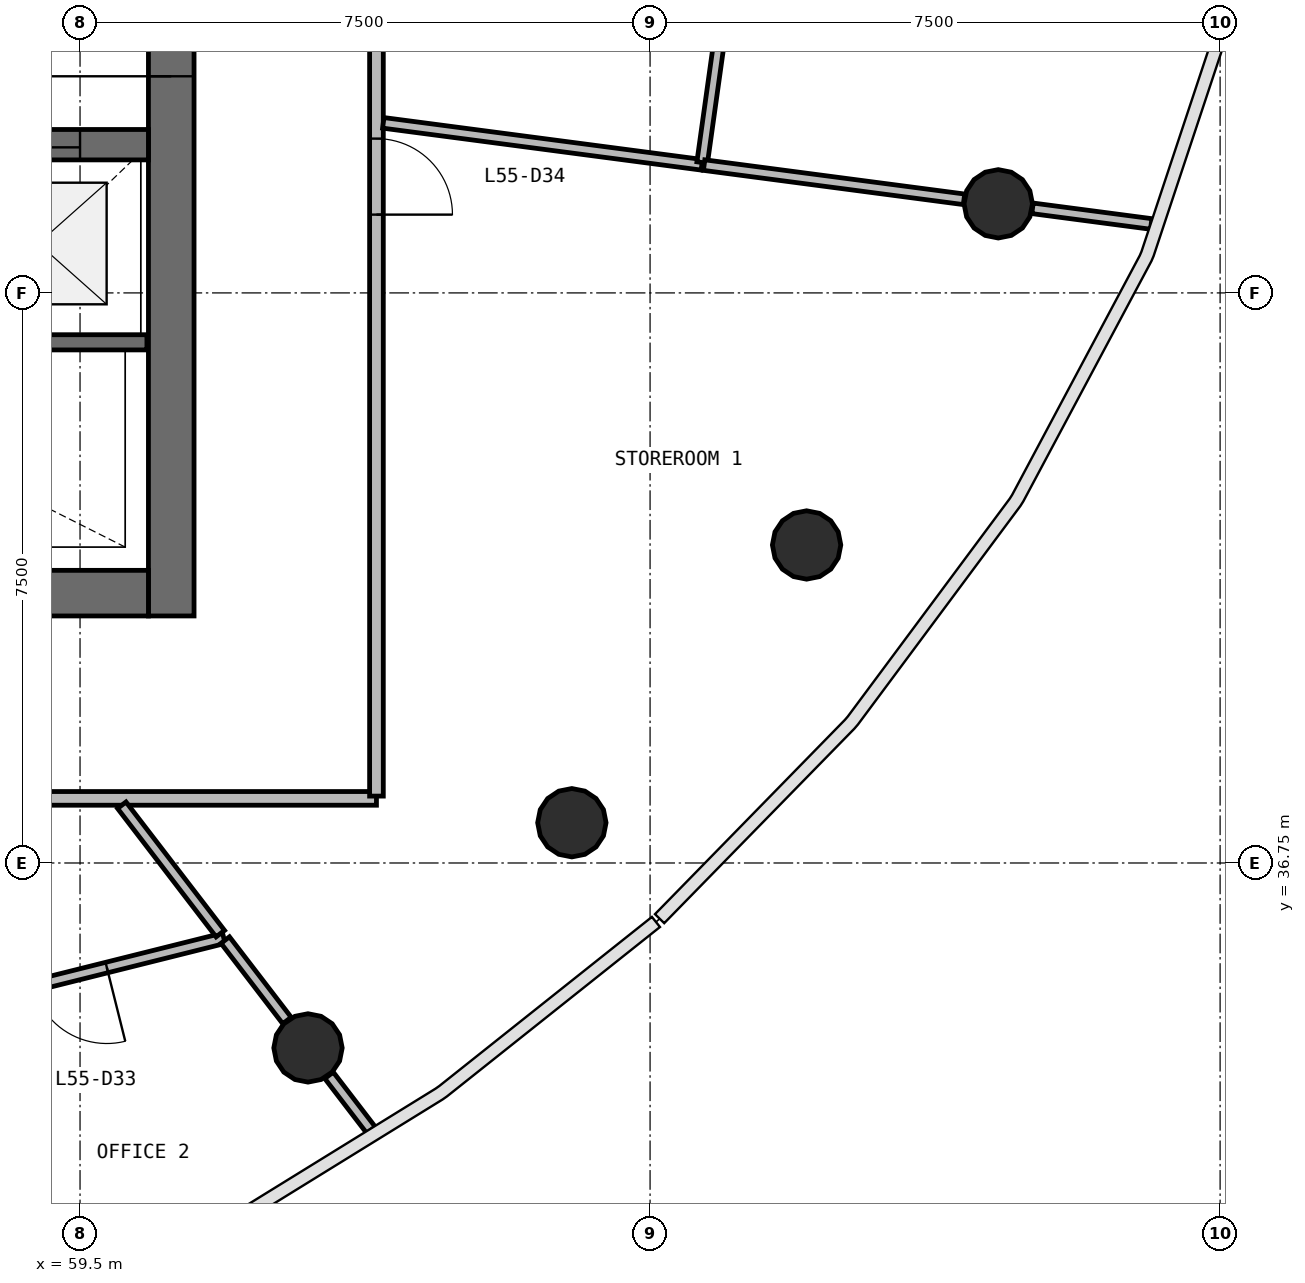
"""IFC4 building model, lengths in metres.
Left out: names, types, materials, properties, quantities, classifications, styles, units other than length and angle.
Written with IfcOpenShell. Run it as: python <this file> out.ifc"""

import sys

from ifc_helpers import new_model, si_unit, direction, frame, frame_2d, origin, origin_2d, place, context, subcontext, project, spatial, rectangle, circle, extrude, source, transform, mapped, element, fill, save


model = new_model("IFC4")
c1 = context("Model", 3, precision=1e-05, world=origin(), true_north=direction((0.0, 1.0)))
c2 = subcontext(c1, "Body", "Model", "MODEL_VIEW")
j1 = project(units=[si_unit("LENGTHUNIT", "METRE"), si_unit("PLANEANGLEUNIT", "RADIAN")], contexts=[c1])
p1 = place(None, origin())
s1 = spatial("IfcSite", under=j1, at=p1, CompositionType="ELEMENT")
p2 = place(p1, origin())
s2 = spatial("IfcBuilding", under=s1, at=p2, CompositionType="ELEMENT")
p3 = place(p2, frame((0.0, 0.0, 226.7)))
s3 = spatial("IfcBuildingStorey", under=s2, at=p3, CompositionType="ELEMENT", Elevation=226.7)
p4 = place(p3, frame((60.7, 40.0, 0.0), z_axis=(0.0, 0.0, 1.0), x_axis=(0.0, 1.0, 0.0)))
e1 = element("IfcWall", 1, at=p4, inside=s3, PredefinedType="SHEAR", context=c2, shape_type="SweptSolid", body=[
    extrude(rectangle(XDim=16.0, YDim=0.6, at=frame_2d((8.0, 0.0))), origin(), (0.0, 0.0, 1.0), 3.9),
])
p5 = place(p4, frame((7.1, 0.0, 0.0)))
e2 = element("IfcOpeningElement", 2, at=p5, cuts=e1, PredefinedType="OPENING", context=c2, shape_type="SweptSolid", body=[
    extrude(rectangle(XDim=1.8, YDim=2.1, at=frame_2d((0.9, 1.05))), frame((0.0, 0.31, 0.0), z_axis=(0.0, -1.0, 0.0), x_axis=(1.0, 0.0, 0.0)), (0.0, 0.0, 1.0), 0.62),
])
p6 = place(p3, frame((43.6, 40.3, 0.0), z_axis=(0.0, 0.0, 1.0), x_axis=(1.0, 0.0, 0.0)))
e3 = element("IfcWall", 3, at=p6, inside=s3, PredefinedType="SHEAR", context=c2, shape_type="SweptSolid", body=[
    extrude(rectangle(XDim=16.8, YDim=0.6, at=frame_2d((8.4, 0.0))), origin(), (0.0, 0.0, 1.0), 3.9),
])
p7 = place(p6, frame((10.3, 0.0, 0.0)))
e4 = element("IfcOpeningElement", 4, at=p7, cuts=e3, PredefinedType="OPENING", context=c2, shape_type="SweptSolid", body=[
    extrude(rectangle(XDim=1.2, YDim=2.1, at=frame_2d((0.6, 1.05))), frame((0.0, 0.31, 0.0), z_axis=(0.0, -1.0, 0.0), x_axis=(1.0, 0.0, 0.0)), (0.0, 0.0, 1.0), 0.62),
])
p8 = place(p6, frame((7.25, 0.0, 0.0)))
e5 = element("IfcOpeningElement", 5, at=p8, cuts=e3, PredefinedType="OPENING", context=c2, shape_type="SweptSolid", body=[
    extrude(rectangle(XDim=1.1, YDim=2.1, at=frame_2d((0.55, 1.05))), frame((0.0, 0.31, 0.0), z_axis=(0.0, -1.0, 0.0), x_axis=(1.0, 0.0, 0.0)), (0.0, 0.0, 1.0), 0.62),
])
p9 = place(p6, frame((0.7, 0.0, 0.0)))
e6 = element("IfcOpeningElement", 6, at=p9, cuts=e3, PredefinedType="OPENING", context=c2, shape_type="SweptSolid", body=[
    extrude(rectangle(XDim=0.8, YDim=2.1, at=frame_2d((0.4, 1.05))), frame((0.0, 0.31, 0.0), z_axis=(0.0, -1.0, 0.0), x_axis=(1.0, 0.0, 0.0)), (0.0, 0.0, 1.0), 0.62),
])
p10 = place(p3, frame((43.6, 46.2, 0.0), z_axis=(0.0, 0.0, 1.0), x_axis=(1.0, 0.0, 0.0)))
e7 = element("IfcWall", 7, at=p10, inside=s3, PredefinedType="SHEAR", context=c2, shape_type="SweptSolid", body=[
    extrude(rectangle(XDim=16.8, YDim=0.4, at=frame_2d((8.4, 0.0))), origin(), (0.0, 0.0, 1.0), 3.9),
])
p11 = place(p10, frame((9.8, 0.0, 0.0)))
e8 = element("IfcOpeningElement", 8, at=p11, cuts=e7, PredefinedType="OPENING", context=c2, shape_type="SweptSolid", body=[
    extrude(rectangle(XDim=1.1, YDim=2.1, at=frame_2d((0.55, 1.05))), frame((0.0, 0.21, 0.0), z_axis=(0.0, -1.0, 0.0), x_axis=(1.0, 0.0, 0.0)), (0.0, 0.0, 1.0), 0.42),
])
p12 = place(p10, frame((12.3, 0.0, 0.0)))
e9 = element("IfcOpeningElement", 9, at=p12, cuts=e7, PredefinedType="OPENING", context=c2, shape_type="SweptSolid", body=[
    extrude(rectangle(XDim=1.1, YDim=2.1, at=frame_2d((0.55, 1.05))), frame((0.0, 0.21, 0.0), z_axis=(0.0, -1.0, 0.0), x_axis=(1.0, 0.0, 0.0)), (0.0, 0.0, 1.0), 0.42),
])
p13 = place(p10, frame((14.8, 0.0, 0.0)))
e10 = element("IfcOpeningElement", 10, at=p13, cuts=e7, PredefinedType="OPENING", context=c2, shape_type="SweptSolid", body=[
    extrude(rectangle(XDim=1.1, YDim=2.1, at=frame_2d((0.55, 1.05))), frame((0.0, 0.21, 0.0), z_axis=(0.0, -1.0, 0.0), x_axis=(1.0, 0.0, 0.0)), (0.0, 0.0, 1.0), 0.42),
])
p14 = place(p10, frame((2.45, 0.0, 0.0)))
e11 = element("IfcOpeningElement", 11, at=p14, cuts=e7, PredefinedType="OPENING", context=c2, shape_type="SweptSolid", body=[
    extrude(rectangle(XDim=0.9, YDim=2.1, at=frame_2d((0.45, 1.05))), frame((0.0, 0.21, 0.0), z_axis=(0.0, -1.0, 0.0), x_axis=(1.0, 0.0, 0.0)), (0.0, 0.0, 1.0), 0.42),
])
p15 = place(p10, frame((7.85, 0.0, 0.0)))
e12 = element("IfcOpeningElement", 12, at=p15, cuts=e7, PredefinedType="OPENING", context=c2, shape_type="SweptSolid", body=[
    extrude(rectangle(XDim=0.9, YDim=2.1, at=frame_2d((0.45, 1.05))), frame((0.0, 0.21, 0.0), z_axis=(0.0, -1.0, 0.0), x_axis=(1.0, 0.0, 0.0)), (0.0, 0.0, 1.0), 0.42),
])
m1 = source(origin(), c2, "Body", "SweptSolid", [
    extrude(circle(Radius=0.45, at=origin_2d()), origin(), (0.0, 0.0, 1.0), 3.9),
])
for number, where, z_axis, x_axis in (
    (13, (62.499, 34.317, 0.0), (0.0, 0.0, 1.0), (1.0, 0.0, 0.0)),
    (14, (65.971, 37.28, 0.0), (0.0, 0.0, 1.0), (1.0, 0.0, 0.0)),
    (15, (69.059, 40.934, 0.0), (0.0, 0.0, 1.0), (1.0, 0.0, 0.0)),
    (16, (71.581, 45.422, 0.0), (0.0, 0.0, 1.0), (1.0, 0.0, 0.0)),
):
    element("IfcColumn", number, at=place(p3, frame(where, z_axis=z_axis, x_axis=x_axis)), inside=s3, PredefinedType="COLUMN", context=c2, shape_type="MappedRepresentation", body=[
        mapped(m1, transform((0.0, 0.0, 0.0), scale=1.0)),
    ])
p16 = place(p3, frame((57.7, 43.6, 0.0), z_axis=(0.0, 0.0, 1.0), x_axis=(1.0, 0.0, 0.0)))
e17 = element("IfcWall", 17, at=p16, inside=s3, PredefinedType="SOLIDWALL", context=c2, shape_type="SweptSolid", body=[
    extrude(rectangle(XDim=2.68, YDim=0.2, at=frame_2d((1.34, 0.0))), origin(), (0.0, 0.0, 1.0), 3.4),
])
p17 = place(p3, frame((63.4, 37.6, 0.0), z_axis=(0.0, 0.0, 1.0), x_axis=(-1.0, 0.0, 0.0)))
e18 = element("IfcWall", 18, at=p17, inside=s3, PredefinedType="PARTITIONING", context=c2, shape_type="SweptSolid", body=[
    extrude(rectangle(XDim=22.8, YDim=0.18, at=frame_2d((11.4, 0.0))), origin(), (0.0, 0.0, 1.0), 2.7),
])
p18 = place(p17, frame((16.15, 0.0, 0.0)))
e19 = element("IfcOpeningElement", 19, at=p18, cuts=e18, PredefinedType="OPENING", context=c2, shape_type="SweptSolid", body=[
    extrude(rectangle(XDim=1.0, YDim=2.1, at=frame_2d((0.5, 1.05))), frame((0.0, 0.1, 0.0), z_axis=(0.0, -1.0, 0.0), x_axis=(1.0, 0.0, 0.0)), (0.0, 0.0, 1.0), 0.2),
])
p19 = place(p17, frame((10.95, 0.0, 0.0)))
e20 = element("IfcOpeningElement", 20, at=p19, cuts=e18, PredefinedType="OPENING", context=c2, shape_type="SweptSolid", body=[
    extrude(rectangle(XDim=1.0, YDim=2.1, at=frame_2d((0.5, 1.05))), frame((0.0, 0.1, 0.0), z_axis=(0.0, -1.0, 0.0), x_axis=(1.0, 0.0, 0.0)), (0.0, 0.0, 1.0), 0.2),
])
p20 = place(p3, frame((63.4, 58.37, 0.0), z_axis=(0.0, 0.0, 1.0), x_axis=(0.0, -1.0, 0.0)))
e21 = element("IfcWall", 21, at=p20, inside=s3, PredefinedType="PARTITIONING", context=c2, shape_type="SweptSolid", body=[
    extrude(rectangle(XDim=20.74, YDim=0.18, at=frame_2d((10.37, 0.0))), origin(), (0.0, 0.0, 1.0), 2.7),
])
p21 = place(p20, frame((12.09, 0.0, 0.0)))
e22 = element("IfcOpeningElement", 22, at=p21, cuts=e21, PredefinedType="OPENING", context=c2, shape_type="SweptSolid", body=[
    extrude(rectangle(XDim=1.0, YDim=2.1, at=frame_2d((0.5, 1.05))), frame((0.0, 0.1, 0.0), z_axis=(0.0, -1.0, 0.0), x_axis=(1.0, 0.0, 0.0)), (0.0, 0.0, 1.0), 0.2),
])
p22 = place(p20, frame((9.89, 0.0, 0.0)))
e23 = element("IfcOpeningElement", 23, at=p22, cuts=e21, PredefinedType="OPENING", context=c2, shape_type="SweptSolid", body=[
    extrude(rectangle(XDim=1.0, YDim=2.1, at=frame_2d((0.5, 1.05))), frame((0.0, 0.1, 0.0), z_axis=(0.0, -1.0, 0.0), x_axis=(1.0, 0.0, 0.0)), (0.0, 0.0, 1.0), 0.2),
])
p23 = place(p20, frame((4.29, 0.0, 0.0)))
e24 = element("IfcOpeningElement", 24, at=p23, cuts=e21, PredefinedType="OPENING", context=c2, shape_type="SweptSolid", body=[
    extrude(rectangle(XDim=1.0, YDim=2.1, at=frame_2d((0.5, 1.05))), frame((0.0, 0.1, 0.0), z_axis=(0.0, -1.0, 0.0), x_axis=(1.0, 0.0, 0.0)), (0.0, 0.0, 1.0), 0.2),
])
p24 = place(p3, frame((63.49, 46.487, 0.0), z_axis=(0.0, 0.0, 1.0), x_axis=(0.991446431295, -0.130514266934, 0.0)))
e25 = element("IfcWall", 25, at=p24, inside=s3, PredefinedType="PARTITIONING", context=c2, shape_type="SweptSolid", body=[
    extrude(rectangle(XDim=4.228, YDim=0.14, at=frame_2d((2.114, 0.0))), origin(), (0.0, 0.0, 1.0), 2.7),
])
p25 = place(p3, frame((68.267, 50.112, 0.0), z_axis=(0.0, 0.0, 1.0), x_axis=(-0.138751908501, -0.990327172144, 0.0)))
e26 = element("IfcWall", 26, at=p25, inside=s3, PredefinedType="PARTITIONING", context=c2, shape_type="SweptSolid", body=[
    extrude(rectangle(XDim=4.188, YDim=0.14, at=frame_2d((2.094, 0.0))), origin(), (0.0, 0.0, 1.0), 2.7),
])
p26 = place(p25, frame((1.538, 0.0, 0.0)))
e27 = element("IfcOpeningElement", 27, at=p26, cuts=e26, PredefinedType="OPENING", context=c2, shape_type="SweptSolid", body=[
    extrude(rectangle(XDim=1.0, YDim=2.1, at=frame_2d((0.5, 1.05))), frame((0.0, 0.08, 0.0), z_axis=(0.0, -1.0, 0.0), x_axis=(1.0, 0.0, 0.0)), (0.0, 0.0, 1.0), 0.16),
])
p27 = place(p3, frame((61.392, 35.76, 0.0), z_axis=(0.0, 0.0, 1.0), x_axis=(-0.970103355672, -0.242692149262, 0.0)))
e28 = element("IfcWall", 28, at=p27, inside=s3, PredefinedType="PARTITIONING", context=c2, shape_type="SweptSolid", body=[
    extrude(rectangle(XDim=4.037, YDim=0.14, at=frame_2d((2.019, 0.0))), origin(), (0.0, 0.0, 1.0), 2.7),
])
p28 = place(p27, frame((1.587, 0.0, 0.0)))
e29 = element("IfcOpeningElement", 29, at=p28, cuts=e28, PredefinedType="OPENING", context=c2, shape_type="SweptSolid", body=[
    extrude(rectangle(XDim=1.0, YDim=2.1, at=frame_2d((0.5, 1.05))), frame((0.0, 0.08, 0.0), z_axis=(0.0, -1.0, 0.0), x_axis=(1.0, 0.0, 0.0)), (0.0, 0.0, 1.0), 0.16),
])
p29 = place(p3, frame((67.711, 45.932, 0.0), z_axis=(0.0, 0.0, 1.0), x_axis=(0.991442967003, -0.130540580589, 0.0)))
e30 = element("IfcWall", 30, at=p29, inside=s3, PredefinedType="PARTITIONING", context=c2, shape_type="SweptSolid", body=[
    extrude(rectangle(XDim=3.449, YDim=0.14, at=frame_2d((1.724, 0.0))), origin(), (0.0, 0.0, 1.0), 2.7),
])
p30 = place(p3, frame((60.049, 37.51, 0.0), z_axis=(0.0, 0.0, 1.0), x_axis=(0.608713079652, -0.793390437717, 0.0)))
e31 = element("IfcWall", 31, at=p30, inside=s3, PredefinedType="PARTITIONING", context=c2, shape_type="SweptSolid", body=[
    extrude(rectangle(XDim=2.13, YDim=0.14, at=frame_2d((1.065, 0.0))), origin(), (0.0, 0.0, 1.0), 2.7),
])
p31 = place(p3, frame((72.031, 45.363, 0.0), z_axis=(0.0, 0.0, 1.0), x_axis=(0.991431072845, -0.130630883778, 0.0)))
e32 = element("IfcWall", 32, at=p31, inside=s3, PredefinedType="PARTITIONING", context=c2, shape_type="SweptSolid", body=[
    extrude(rectangle(XDim=1.575, YDim=0.14, at=frame_2d((0.788, 0.0))), origin(), (0.0, 0.0, 1.0), 2.7),
])
p32 = place(p3, frame((61.41, 35.736, 0.0), z_axis=(0.0, 0.0, 1.0), x_axis=(0.608746478316, -0.793364812137, 0.0)))
e33 = element("IfcWall", 33, at=p32, inside=s3, PredefinedType="PARTITIONING", context=c2, shape_type="SweptSolid", body=[
    extrude(rectangle(XDim=1.334, YDim=0.14, at=frame_2d((0.667, 0.0))), origin(), (0.0, 0.0, 1.0), 2.7),
])
p33 = place(p3, frame((62.776, 33.956, 0.0), z_axis=(0.0, 0.0, 1.0), x_axis=(0.608826656725, -0.793303285044, 0.0)))
e34 = element("IfcWall", 34, at=p33, inside=s3, PredefinedType="PARTITIONING", context=c2, shape_type="SweptSolid", body=[
    extrude(rectangle(XDim=0.908, YDim=0.14, at=frame_2d((0.454, 0.0))), origin(), (0.0, 0.0, 1.0), 2.7),
])
m2 = source(origin(), c2, "Body", "SweptSolid", [
    extrude(rectangle(XDim=1.8, YDim=2.1, at=frame_2d((0.9, 1.05))), frame((0.0, 0.025, 0.0), z_axis=(0.0, -1.0, 0.0), x_axis=(1.0, 0.0, 0.0)), (0.0, 0.0, 1.0), 0.05),
])
p34 = place(p5, origin())
e35 = element("IfcDoor", 35, at=p34, inside=s3, OperationType="SINGLE_SWING_LEFT", PredefinedType="DOOR", context=c2, shape_type="MappedRepresentation", body=[
    mapped(m2, transform((0.0, 0.0, 0.0), scale=1.0)),
])
fill(e2, e35)
m3 = source(origin(), c2, "Body", "SweptSolid", [
    extrude(rectangle(XDim=1.1, YDim=2.1, at=frame_2d((0.55, 1.05))), frame((0.0, 0.025, 0.0), z_axis=(0.0, -1.0, 0.0), x_axis=(1.0, 0.0, 0.0)), (0.0, 0.0, 1.0), 0.05),
])
p35 = place(p13, origin())
e36 = element("IfcDoor", 36, at=p35, inside=s3, OperationType="DOUBLE_DOOR_SLIDING", PredefinedType="USERDEFINED", context=c2, shape_type="MappedRepresentation", body=[
    mapped(m3, transform((0.0, 0.0, 0.0), scale=1.0)),
])
fill(e10, e36)
m4 = source(origin(), c2, "Body", "SweptSolid", [
    extrude(rectangle(XDim=1.0, YDim=2.1, at=frame_2d((0.5, 1.05))), frame((0.0, 0.025, 0.0), z_axis=(0.0, -1.0, 0.0), x_axis=(1.0, 0.0, 0.0)), (0.0, 0.0, 1.0), 0.05),
])
p36 = place(p28, origin())
e37 = element("IfcDoor", 37, at=p36, inside=s3, OperationType="SINGLE_SWING_LEFT", PredefinedType="DOOR", context=c2, shape_type="MappedRepresentation", body=[
    mapped(m4, transform((0.0, 0.0, 0.0), scale=1.0)),
])
fill(e29, e37)
p37 = place(p21, origin())
e38 = element("IfcDoor", 38, at=p37, inside=s3, OperationType="SINGLE_SWING_RIGHT", PredefinedType="DOOR", context=c2, shape_type="MappedRepresentation", body=[
    mapped(m4, transform((0.0, 0.0, 0.0), scale=1.0)),
])
fill(e22, e38)
save(model, sys.argv[1])
